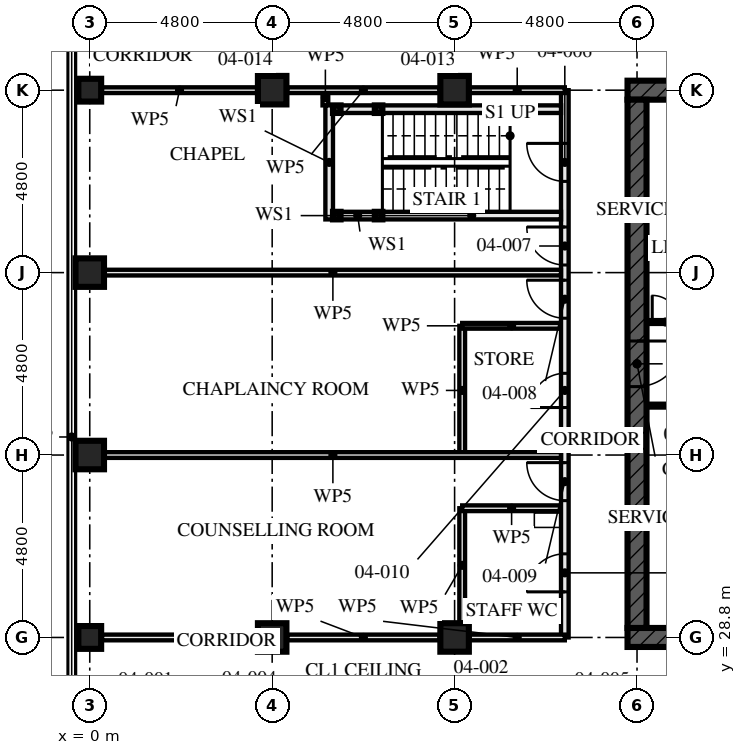
"""IFC4 building model, lengths in metres.
Left out: names, types, materials, properties, quantities, classifications, styles, units other than length and angle.
Written with IfcOpenShell. Run it as: python <this file> out.ifc"""

import sys

from ifc_helpers import new_model, si_unit, direction, frame, frame_2d, origin, origin_2d, place, context, subcontext, project, spatial, rectangle, hollow_rectangle, extrude, element, fill, save


model = new_model("IFC4")
c1 = context("Model", 3, precision=1e-05, world=origin(), true_north=direction((0.0, 1.0)))
c2 = subcontext(c1, "Body", "Model", "MODEL_VIEW")
j1 = project(units=[si_unit("LENGTHUNIT", "METRE"), si_unit("PLANEANGLEUNIT", "RADIAN")], contexts=[c1])
p1 = place(None, origin())
s1 = spatial("IfcSite", under=j1, at=p1, CompositionType="ELEMENT")
p2 = place(p1, origin())
s2 = spatial("IfcBuilding", under=s1, at=p2, CompositionType="ELEMENT")
p3 = place(p2, frame((0.0, 0.0, 18.0)))
s3 = spatial("IfcBuildingStorey", under=s2, at=p3, CompositionType="ELEMENT", Elevation=18.0)
p4 = place(p3, frame((0.0, 28.8, 0.0), z_axis=(0.0, 0.0, 1.0), x_axis=(0.0, 1.0, 0.0)))
e1 = element("IfcColumn", 1, at=p4, inside=s3, PredefinedType="COLUMN", context=c2, shape_type="SweptSolid", body=[
    extrude(hollow_rectangle(XDim=0.6, YDim=0.6, WallThickness=0.08, at=origin_2d()), origin(), (0.0, 0.0, 1.0), 4.5),
])
for number, where, z_axis, x_axis in (
    (2, (0.0, 33.6, 0.0), (0.0, 0.0, 1.0), (1.0, 0.0, 0.0)),
    (3, (0.0, 38.4, 0.0), (0.0, 0.0, 1.0), (1.0, 0.0, 0.0)),
):
    element("IfcColumn", number, at=place(p3, frame(where, z_axis=z_axis, x_axis=x_axis)), inside=s3, PredefinedType="COLUMN", context=c2, shape_type="SweptSolid", body=[
        extrude(hollow_rectangle(XDim=0.75, YDim=0.75, WallThickness=0.08, at=origin_2d()), origin(), (0.0, 0.0, 1.0), 4.5),
    ])
p5 = place(p3, frame((0.0, 43.2, 0.0), z_axis=(0.0, 0.0, 1.0), x_axis=(0.0, 1.0, 0.0)))
e4 = element("IfcColumn", 4, at=p5, inside=s3, PredefinedType="COLUMN", context=c2, shape_type="SweptSolid", body=[
    extrude(hollow_rectangle(XDim=0.6, YDim=0.6, WallThickness=0.08, at=origin_2d()), origin(), (0.0, 0.0, 1.0), 4.5),
])
for number, where, z_axis, x_axis in (
    (5, (4.8, 28.8, 0.0), (0.0, 0.0, 1.0), (0.0, 1.0, 0.0)),
    (6, (4.8, 43.2, 0.0), (0.0, 0.0, 1.0), (0.0, 1.0, 0.0)),
    (7, (9.6, 28.8, 0.0), (0.0, 0.0, 1.0), (0.0, 1.0, 0.0)),
    (8, (9.6, 43.2, 0.0), (0.0, 0.0, 1.0), (0.0, 1.0, 0.0)),
):
    element("IfcColumn", number, at=place(p3, frame(where, z_axis=z_axis, x_axis=x_axis)), inside=s3, PredefinedType="COLUMN", context=c2, shape_type="SweptSolid", body=[
        extrude(hollow_rectangle(XDim=0.75, YDim=0.75, WallThickness=0.08, at=origin_2d()), origin(), (0.0, 0.0, 1.0), 4.5),
    ])
p6 = place(p3, frame((14.15, 28.8, -0.17), z_axis=(0.0, 0.0, 1.0), x_axis=(1.0, 0.0, 0.0)))
e9 = element("IfcWall", 9, at=p6, inside=s3, PredefinedType="SHEAR", context=c2, shape_type="SweptSolid", body=[
    extrude(rectangle(XDim=14.9, YDim=0.5, at=frame_2d((7.45, 0.0))), origin(), (0.0, 0.0, 1.0), 4.5),
])
p7 = place(p6, frame((6.85, 0.0, 0.17)))
e10 = element("IfcOpeningElement", 10, at=p7, cuts=e9, PredefinedType="OPENING", context=c2, shape_type="SweptSolid", body=[
    extrude(rectangle(XDim=1.2, YDim=2.1, at=frame_2d((0.6, 1.05))), frame((0.0, 0.26, 0.0), z_axis=(0.0, -1.0, 0.0), x_axis=(1.0, 0.0, 0.0)), (0.0, 0.0, 1.0), 0.521),
])
p8 = place(p3, frame((29.05, 43.2, -0.17), z_axis=(0.0, 0.0, 1.0), x_axis=(-1.0, 0.0, 0.0)))
e11 = element("IfcWall", 11, at=p8, inside=s3, PredefinedType="SHEAR", context=c2, shape_type="SweptSolid", body=[
    extrude(rectangle(XDim=14.9, YDim=0.5, at=frame_2d((7.45, 0.0))), origin(), (0.0, 0.0, 1.0), 4.5),
])
p9 = place(p8, frame((6.85, 0.0, 0.17)))
e12 = element("IfcOpeningElement", 12, at=p9, cuts=e11, PredefinedType="OPENING", context=c2, shape_type="SweptSolid", body=[
    extrude(rectangle(XDim=1.2, YDim=2.1, at=frame_2d((0.6, 1.05))), frame((0.0, 0.26, 0.0), z_axis=(0.0, -1.0, 0.0), x_axis=(1.0, 0.0, 0.0)), (0.0, 0.0, 1.0), 0.521),
])
p10 = place(p3, frame((14.4, 42.95, -0.17), z_axis=(0.0, 0.0, 1.0), x_axis=(0.0, -1.0, 0.0)))
e13 = element("IfcWall", 13, at=p10, inside=s3, PredefinedType="SHEAR", context=c2, shape_type="SweptSolid", body=[
    extrude(rectangle(XDim=13.9, YDim=0.5, at=frame_2d((6.95, 0.0))), origin(), (0.0, 0.0, 1.0), 4.5),
])
p11 = place(p10, frame((6.35, 0.0, 0.17)))
e14 = element("IfcOpeningElement", 14, at=p11, cuts=e13, PredefinedType="OPENING", context=c2, shape_type="SweptSolid", body=[
    extrude(rectangle(XDim=1.2, YDim=2.1, at=frame_2d((0.6, 1.05))), frame((0.0, 0.26, 0.0), z_axis=(0.0, -1.0, 0.0), x_axis=(1.0, 0.0, 0.0)), (0.0, 0.0, 1.0), 0.521),
])
for number, where, z_axis, x_axis in (
    (15, (6.5, 42.7, 0.0), (0.0, 0.0, 1.0), (1.0, 0.0, 0.0)),
    (16, (6.5, 39.9, 0.0), (0.0, 0.0, 1.0), (1.0, 0.0, 0.0)),
    (17, (7.6, 42.7, 0.0), (0.0, 0.0, 1.0), (1.0, 0.0, 0.0)),
    (18, (7.6, 39.9, 0.0), (0.0, 0.0, 1.0), (1.0, 0.0, 0.0)),
):
    element("IfcColumn", number, at=place(p3, frame(where, z_axis=z_axis, x_axis=x_axis)), inside=s3, PredefinedType="COLUMN", context=c2, shape_type="SweptSolid", body=[
        extrude(hollow_rectangle(XDim=0.2, YDim=0.2, WallThickness=0.008, at=origin_2d()), origin(), (0.0, 0.0, 1.0), 4.33),
    ])
p12 = place(p3, frame((6.6, 42.7, 0.0), z_axis=(0.0, 0.0, 1.0), x_axis=(1.0, 0.0, 0.0)))
e19 = element("IfcWall", 19, at=p12, inside=s3, PredefinedType="SOLIDWALL", context=c2, shape_type="SweptSolid", body=[
    extrude(rectangle(XDim=0.9, YDim=0.2, at=frame_2d((0.45, 0.0))), origin(), (0.0, 0.0, 1.0), 3.99),
])
p13 = place(p3, frame((7.7, 42.7, 0.0), z_axis=(0.0, 0.0, 1.0), x_axis=(1.0, 0.0, 0.0)))
e20 = element("IfcWall", 20, at=p13, inside=s3, PredefinedType="SOLIDWALL", context=c2, shape_type="SweptSolid", body=[
    extrude(rectangle(XDim=4.7, YDim=0.2, at=frame_2d((2.35, 0.0))), origin(), (0.0, 0.0, 1.0), 3.99),
])
p14 = place(p3, frame((6.6, 39.9, 0.0), z_axis=(0.0, 0.0, 1.0), x_axis=(1.0, 0.0, 0.0)))
e21 = element("IfcWall", 21, at=p14, inside=s3, PredefinedType="SOLIDWALL", context=c2, shape_type="SweptSolid", body=[
    extrude(rectangle(XDim=0.9, YDim=0.2, at=frame_2d((0.45, 0.0))), origin(), (0.0, 0.0, 1.0), 3.99),
])
p15 = place(p3, frame((7.7, 39.9, 0.0), z_axis=(0.0, 0.0, 1.0), x_axis=(1.0, 0.0, 0.0)))
e22 = element("IfcWall", 22, at=p15, inside=s3, PredefinedType="SOLIDWALL", context=c2, shape_type="SweptSolid", body=[
    extrude(rectangle(XDim=4.7, YDim=0.2, at=frame_2d((2.35, 0.0))), origin(), (0.0, 0.0, 1.0), 3.99),
])
p16 = place(p3, frame((6.3, 42.8, 0.0), z_axis=(0.0, 0.0, 1.0), x_axis=(0.0, -1.0, 0.0)))
e23 = element("IfcWall", 23, at=p16, inside=s3, PredefinedType="SOLIDWALL", context=c2, shape_type="SweptSolid", body=[
    extrude(rectangle(XDim=3.0, YDim=0.2, at=frame_2d((1.5, 0.0))), origin(), (0.0, 0.0, 1.0), 4.33),
])
p17 = place(p3, frame((9.8, 37.0, 0.0), z_axis=(0.0, 0.0, 1.0), x_axis=(1.0, 0.0, 0.0)))
e24 = element("IfcWall", 24, at=p17, inside=s3, PredefinedType="PARTITIONING", context=c2, shape_type="SweptSolid", body=[
    extrude(rectangle(XDim=2.6, YDim=0.15, at=frame_2d((1.3, 0.0))), origin(), (0.0, 0.0, 1.0), 4.33),
])
p18 = place(p3, frame((9.8, 37.0, 0.0), z_axis=(0.0, 0.0, 1.0), x_axis=(0.0, -1.0, 0.0)))
e25 = element("IfcWall", 25, at=p18, inside=s3, PredefinedType="PARTITIONING", context=c2, shape_type="SweptSolid", body=[
    extrude(rectangle(XDim=3.4, YDim=0.15, at=frame_2d((1.7, 0.0))), origin(), (0.0, 0.0, 1.0), 4.33),
])
p19 = place(p3, frame((9.8, 32.2, 0.0), z_axis=(0.0, 0.0, 1.0), x_axis=(1.0, 0.0, 0.0)))
e26 = element("IfcWall", 26, at=p19, inside=s3, PredefinedType="PARTITIONING", context=c2, shape_type="SweptSolid", body=[
    extrude(rectangle(XDim=2.6, YDim=0.15, at=frame_2d((1.3, 0.0))), origin(), (0.0, 0.0, 1.0), 4.33),
])
p20 = place(p3, frame((9.8, 32.2, 0.0), z_axis=(0.0, 0.0, 1.0), x_axis=(0.0, -1.0, 0.0)))
e27 = element("IfcWall", 27, at=p20, inside=s3, PredefinedType="PARTITIONING", context=c2, shape_type="SweptSolid", body=[
    extrude(rectangle(XDim=3.005, YDim=0.15, at=frame_2d((1.502, 0.0))), origin(), (0.0, 0.0, 1.0), 4.33),
])
for number, where, z_axis, x_axis in (
    (28, (0.395, 38.4, 0.0), (0.0, 0.0, 1.0), (1.0, 0.0, 0.0)),
    (29, (0.395, 33.6, 0.0), (0.0, 0.0, 1.0), (1.0, 0.0, 0.0)),
):
    element("IfcWall", number, at=place(p3, frame(where, z_axis=z_axis, x_axis=x_axis)), inside=s3, PredefinedType="PARTITIONING", context=c2, shape_type="SweptSolid", body=[
        extrude(rectangle(XDim=12.005, YDim=0.15, at=frame_2d((6.002, 0.0))), origin(), (0.0, 0.0, 1.0), 3.55),
    ])
p21 = place(p3, frame((6.2, 43.2, 0.0), z_axis=(0.0, 0.0, 1.0), x_axis=(0.0, -1.0, 0.0)))
e30 = element("IfcWall", 30, at=p21, inside=s3, PredefinedType="PARTITIONING", context=c2, shape_type="SweptSolid", body=[
    extrude(rectangle(XDim=0.4, YDim=0.15, at=frame_2d((0.2, 0.0))), origin(), (0.0, 0.0, 1.0), 4.33),
])
p22 = place(p3, frame((12.5, 43.2, 0.0), z_axis=(0.0, 0.0, 1.0), x_axis=(0.0, -1.0, 0.0)))
e31 = element("IfcWall", 31, at=p22, inside=s3, PredefinedType="PARTITIONING", context=c2, shape_type="SweptSolid", body=[
    extrude(rectangle(XDim=14.4, YDim=0.2, at=frame_2d((7.2, 0.0))), origin(), (0.0, 0.0, 1.0), 3.55),
])
p23 = place(p22, frame((1.4, 0.0, 0.0)))
e32 = element("IfcOpeningElement", 32, at=p23, cuts=e31, PredefinedType="OPENING", context=c2, shape_type="SweptSolid", body=[
    extrude(rectangle(XDim=1.0, YDim=2.1, at=frame_2d((0.5, 1.05))), frame((0.0, 0.111, 0.0), z_axis=(0.0, -1.0, 0.0), x_axis=(1.0, 0.0, 0.0)), (0.0, 0.0, 1.0), 0.221),
])
p24 = place(p22, frame((3.6, 0.0, 0.0)))
e33 = element("IfcOpeningElement", 33, at=p24, cuts=e31, PredefinedType="OPENING", context=c2, shape_type="SweptSolid", body=[
    extrude(rectangle(XDim=1.0, YDim=2.4, at=frame_2d((0.5, 1.2))), frame((0.0, 0.111, 0.0), z_axis=(0.0, -1.0, 0.0), x_axis=(1.0, 0.0, 0.0)), (0.0, 0.0, 1.0), 0.221),
])
p25 = place(p22, frame((5.0, 0.0, 0.0)))
e34 = element("IfcOpeningElement", 34, at=p25, cuts=e31, PredefinedType="OPENING", context=c2, shape_type="SweptSolid", body=[
    extrude(rectangle(XDim=1.0, YDim=2.4, at=frame_2d((0.5, 1.2))), frame((0.0, 0.111, 0.0), z_axis=(0.0, -1.0, 0.0), x_axis=(1.0, 0.0, 0.0)), (0.0, 0.0, 1.0), 0.221),
])
p26 = place(p22, frame((9.8, 0.0, 0.0)))
e35 = element("IfcOpeningElement", 35, at=p26, cuts=e31, PredefinedType="OPENING", context=c2, shape_type="SweptSolid", body=[
    extrude(rectangle(XDim=1.0, YDim=2.4, at=frame_2d((0.5, 1.2))), frame((0.0, 0.111, 0.0), z_axis=(0.0, -1.0, 0.0), x_axis=(1.0, 0.0, 0.0)), (0.0, 0.0, 1.0), 0.221),
])
p27 = place(p22, frame((7.45, 0.0, 0.0)))
e36 = element("IfcOpeningElement", 36, at=p27, cuts=e31, PredefinedType="OPENING", context=c2, shape_type="SweptSolid", body=[
    extrude(rectangle(XDim=0.9, YDim=2.1, at=frame_2d((0.45, 1.05))), frame((0.0, 0.111, 0.0), z_axis=(0.0, -1.0, 0.0), x_axis=(1.0, 0.0, 0.0)), (0.0, 0.0, 1.0), 0.221),
])
p28 = place(p22, frame((12.2, 0.0, 0.0)))
e37 = element("IfcOpeningElement", 37, at=p28, cuts=e31, PredefinedType="OPENING", context=c2, shape_type="SweptSolid", body=[
    extrude(rectangle(XDim=1.0, YDim=2.1, at=frame_2d((0.5, 1.05))), frame((0.0, 0.111, 0.0), z_axis=(0.0, -1.0, 0.0), x_axis=(1.0, 0.0, 0.0)), (0.0, 0.0, 1.0), 0.221),
])
p29 = place(p3, frame((14.65, 34.9, 0.0), z_axis=(0.0, 0.0, 1.0), x_axis=(1.0, 0.0, 0.0)))
e38 = element("IfcWall", 38, at=p29, inside=s3, PredefinedType="SOLIDWALL", context=c2, shape_type="SweptSolid", body=[
    extrude(rectangle(XDim=5.9, YDim=0.1, at=frame_2d((2.95, 0.0))), origin(), (0.0, 0.0, 1.0), 4.33),
])
p30 = place(p29, frame((1.6, 0.0, 0.0)))
e39 = element("IfcOpeningElement", 39, at=p30, cuts=e38, PredefinedType="OPENING", context=c2, shape_type="SweptSolid", body=[
    extrude(rectangle(XDim=0.7, YDim=2.1, at=frame_2d((0.35, 1.05))), frame((0.0, 0.061, 0.0), z_axis=(0.0, -1.0, 0.0), x_axis=(1.0, 0.0, 0.0)), (0.0, 0.0, 1.0), 0.121),
])
p31 = place(p3, frame((14.65, 37.1, 0.0), z_axis=(0.0, 0.0, 1.0), x_axis=(1.0, 0.0, 0.0)))
e40 = element("IfcWall", 40, at=p31, inside=s3, PredefinedType="SOLIDWALL", context=c2, shape_type="SweptSolid", body=[
    extrude(rectangle(XDim=5.9, YDim=0.1, at=frame_2d((2.95, 0.0))), origin(), (0.0, 0.0, 1.0), 4.33),
])
p32 = place(p31, frame((0.15, 0.0, 0.0)))
e41 = element("IfcOpeningElement", 41, at=p32, cuts=e40, PredefinedType="OPENING", context=c2, shape_type="SweptSolid", body=[
    extrude(rectangle(XDim=0.7, YDim=2.1, at=frame_2d((0.35, 1.05))), frame((0.0, 0.061, 0.0), z_axis=(0.0, -1.0, 0.0), x_axis=(1.0, 0.0, 0.0)), (0.0, 0.0, 1.0), 0.121),
])
p33 = place(p31, frame((1.5, 0.0, 0.0)))
e42 = element("IfcOpeningElement", 42, at=p33, cuts=e40, PredefinedType="OPENING", context=c2, shape_type="SweptSolid", body=[
    extrude(rectangle(XDim=0.9, YDim=2.1, at=frame_2d((0.45, 1.05))), frame((0.0, 0.061, 0.0), z_axis=(0.0, -1.0, 0.0), x_axis=(1.0, 0.0, 0.0)), (0.0, 0.0, 1.0), 0.121),
])
p34 = place(p3, frame((12.5, 28.8, 0.0), z_axis=(0.0, 0.0, 1.0), x_axis=(-1.0, 0.0, 0.0)))
e43 = element("IfcWall", 43, at=p34, inside=s3, PredefinedType="PARTITIONING", context=c2, shape_type="SweptSolid", body=[
    extrude(rectangle(XDim=2.505, YDim=0.15, at=frame_2d((1.252, 0.0))), origin(), (0.0, 0.0, 1.0), 3.32),
])
p35 = place(p3, frame((9.205, 28.8, 0.0), z_axis=(0.0, 0.0, 1.0), x_axis=(-1.0, 0.0, 0.0)))
e44 = element("IfcWall", 44, at=p35, inside=s3, PredefinedType="PARTITIONING", context=c2, shape_type="SweptSolid", body=[
    extrude(rectangle(XDim=4.01, YDim=0.15, at=frame_2d((2.005, 0.0))), origin(), (0.0, 0.0, 1.0), 3.32),
])
p36 = place(p3, frame((4.405, 28.8, 0.0), z_axis=(0.0, 0.0, 1.0), x_axis=(-1.0, 0.0, 0.0)))
e45 = element("IfcWall", 45, at=p36, inside=s3, PredefinedType="PARTITIONING", context=c2, shape_type="SweptSolid", body=[
    extrude(rectangle(XDim=4.085, YDim=0.15, at=frame_2d((2.042, 0.0))), origin(), (0.0, 0.0, 1.0), 3.32),
])
p37 = place(p3, frame((12.5, 43.2, 0.0), z_axis=(0.0, 0.0, 1.0), x_axis=(-1.0, 0.0, 0.0)))
e46 = element("IfcWall", 46, at=p37, inside=s3, PredefinedType="PARTITIONING", context=c2, shape_type="SweptSolid", body=[
    extrude(rectangle(XDim=2.505, YDim=0.15, at=frame_2d((1.252, 0.0))), origin(), (0.0, 0.0, 1.0), 3.32),
])
p38 = place(p3, frame((9.205, 43.2, 0.0), z_axis=(0.0, 0.0, 1.0), x_axis=(-1.0, 0.0, 0.0)))
e47 = element("IfcWall", 47, at=p38, inside=s3, PredefinedType="PARTITIONING", context=c2, shape_type="SweptSolid", body=[
    extrude(rectangle(XDim=4.01, YDim=0.15, at=frame_2d((2.005, 0.0))), origin(), (0.0, 0.0, 1.0), 3.32),
])
p39 = place(p3, frame((4.405, 43.2, 0.0), z_axis=(0.0, 0.0, 1.0), x_axis=(-1.0, 0.0, 0.0)))
e48 = element("IfcWall", 48, at=p39, inside=s3, PredefinedType="PARTITIONING", context=c2, shape_type="SweptSolid", body=[
    extrude(rectangle(XDim=4.085, YDim=0.15, at=frame_2d((2.042, 0.0))), origin(), (0.0, 0.0, 1.0), 3.32),
])
p40 = place(p23, frame((1.0, 0.0, 0.0), z_axis=(0.0, 0.0, 1.0), x_axis=(-1.0, 0.0, 0.0)))
e49 = element("IfcDoor", 49, at=p40, inside=s3, OperationType="SINGLE_SWING_LEFT", PredefinedType="DOOR", context=c2, shape_type="SweptSolid", body=[
    extrude(rectangle(XDim=1.0, YDim=2.1, at=frame_2d((0.5, 1.05))), frame((0.0, 0.032, 0.0), z_axis=(0.0, -1.0, 0.0), x_axis=(1.0, 0.0, 0.0)), (0.0, 0.0, 1.0), 0.064),
])
fill(e32, e49)
p41 = place(p24, frame((1.0, 0.0, 0.0), z_axis=(0.0, 0.0, 1.0), x_axis=(-1.0, 0.0, 0.0)))
e50 = element("IfcDoor", 50, at=p41, inside=s3, OperationType="SINGLE_SWING_LEFT", PredefinedType="DOOR", context=c2, shape_type="SweptSolid", body=[
    extrude(rectangle(XDim=1.0, YDim=2.4, at=frame_2d((0.5, 1.2))), frame((0.0, 0.027, 0.0), z_axis=(0.0, -1.0, 0.0), x_axis=(1.0, 0.0, 0.0)), (0.0, 0.0, 1.0), 0.054),
])
fill(e33, e50)
p42 = place(p25, frame((1.0, 0.0, 0.0), z_axis=(0.0, 0.0, 1.0), x_axis=(-1.0, 0.0, 0.0)))
e51 = element("IfcDoor", 51, at=p42, inside=s3, OperationType="SINGLE_SWING_LEFT", PredefinedType="DOOR", context=c2, shape_type="SweptSolid", body=[
    extrude(rectangle(XDim=1.0, YDim=2.4, at=frame_2d((0.5, 1.2))), frame((0.0, 0.027, 0.0), z_axis=(0.0, -1.0, 0.0), x_axis=(1.0, 0.0, 0.0)), (0.0, 0.0, 1.0), 0.054),
])
fill(e34, e51)
p43 = place(p26, frame((1.0, 0.0, 0.0), z_axis=(0.0, 0.0, 1.0), x_axis=(-1.0, 0.0, 0.0)))
e52 = element("IfcDoor", 52, at=p43, inside=s3, OperationType="SINGLE_SWING_LEFT", PredefinedType="DOOR", context=c2, shape_type="SweptSolid", body=[
    extrude(rectangle(XDim=1.0, YDim=2.4, at=frame_2d((0.5, 1.2))), frame((0.0, 0.027, 0.0), z_axis=(0.0, -1.0, 0.0), x_axis=(1.0, 0.0, 0.0)), (0.0, 0.0, 1.0), 0.054),
])
fill(e35, e52)
p44 = place(p27, frame((0.9, 0.0, 0.0), z_axis=(0.0, 0.0, 1.0), x_axis=(-1.0, 0.0, 0.0)))
e53 = element("IfcDoor", 53, at=p44, inside=s3, OperationType="SINGLE_SWING_RIGHT", PredefinedType="DOOR", context=c2, shape_type="SweptSolid", body=[
    extrude(rectangle(XDim=0.9, YDim=2.1, at=frame_2d((0.45, 1.05))), frame((0.0, 0.027, 0.0), z_axis=(0.0, -1.0, 0.0), x_axis=(1.0, 0.0, 0.0)), (0.0, 0.0, 1.0), 0.054),
])
fill(e36, e53)
p45 = place(p28, frame((1.0, 0.0, 0.0), z_axis=(0.0, 0.0, 1.0), x_axis=(-1.0, 0.0, 0.0)))
e54 = element("IfcDoor", 54, at=p45, inside=s3, OperationType="SINGLE_SWING_RIGHT", PredefinedType="DOOR", context=c2, shape_type="SweptSolid", body=[
    extrude(rectangle(XDim=1.0, YDim=2.1, at=frame_2d((0.5, 1.05))), frame((0.0, 0.027, 0.0), z_axis=(0.0, -1.0, 0.0), x_axis=(1.0, 0.0, 0.0)), (0.0, 0.0, 1.0), 0.054),
])
fill(e37, e54)
p46 = place(p32, origin())
e55 = element("IfcDoor", 55, at=p46, inside=s3, OperationType="SINGLE_SWING_RIGHT", PredefinedType="DOOR", context=c2, shape_type="SweptSolid", body=[
    extrude(rectangle(XDim=0.7, YDim=2.1, at=frame_2d((0.35, 1.05))), frame((0.0, 0.027, 0.0), z_axis=(0.0, -1.0, 0.0), x_axis=(1.0, 0.0, 0.0)), (0.0, 0.0, 1.0), 0.054),
])
fill(e41, e55)
p47 = place(p11, origin())
e56 = element("IfcDoor", 56, at=p47, inside=s3, OperationType="SINGLE_SWING_LEFT", PredefinedType="DOOR", context=c2, shape_type="SweptSolid", body=[
    extrude(rectangle(XDim=1.2, YDim=2.1, at=frame_2d((0.6, 1.05))), frame((0.0, 0.027, 0.0), z_axis=(0.0, -1.0, 0.0), x_axis=(1.0, 0.0, 0.0)), (0.0, 0.0, 1.0), 0.054),
])
fill(e14, e56)
save(model, sys.argv[1])
